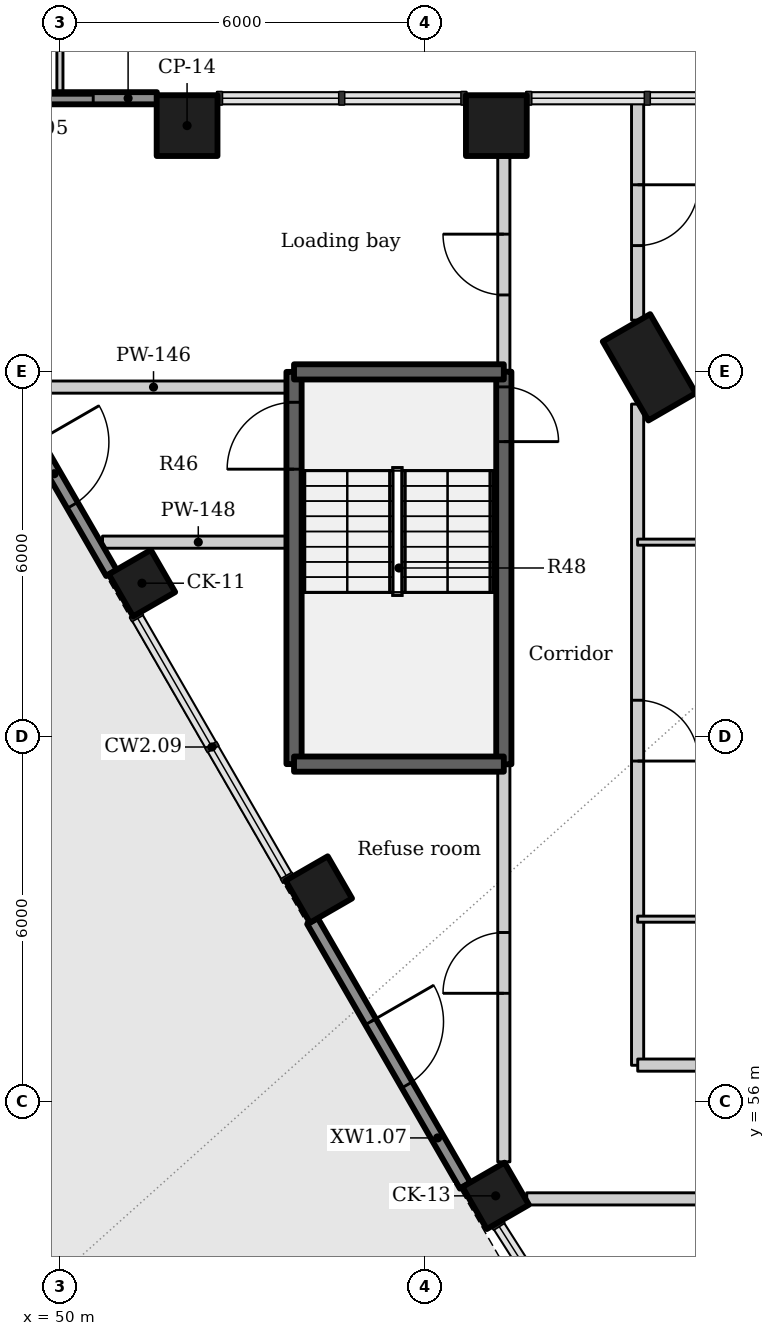
"""IFC4 building model, lengths in metres.
Left out: names, types, materials, properties, quantities, classifications, styles, units other than length and angle.
Written with IfcOpenShell. Run it as: python <this file> out.ifc"""

import sys

from ifc_helpers import new_model, si_unit, direction, frame, frame_2d, origin, origin_2d, place, context, subcontext, project, spatial, rectangle, extrude, element, fill, save


model = new_model("IFC4")
c1 = context("Model", 3, precision=1e-05, world=origin(), true_north=direction((0.0, 1.0)))
c2 = subcontext(c1, "Body", "Model", "MODEL_VIEW")
j1 = project(units=[si_unit("LENGTHUNIT", "METRE"), si_unit("PLANEANGLEUNIT", "RADIAN")], contexts=[c1])
p1 = place(None, origin())
s1 = spatial("IfcSite", under=j1, at=p1, CompositionType="ELEMENT")
p2 = place(p1, origin())
s2 = spatial("IfcBuilding", under=s1, at=p2, CompositionType="ELEMENT")
p3 = place(p2, origin())
s3 = spatial("IfcBuildingStorey", under=s2, at=p3, CompositionType="ELEMENT", Elevation=0.0)
p4 = place(p3, frame((59.692, 68.075, -1.8), z_axis=(0.0, 0.0, 1.0), x_axis=(0.5, -0.866025403784, 0.0)))
e1 = element("IfcColumn", 1, at=p4, inside=s3, PredefinedType="COLUMN", context=c2, shape_type="SweptSolid", body=[
    extrude(rectangle(XDim=1.5, YDim=0.9, at=origin_2d()), origin(), (0.0, 0.0, 1.0), 8.4),
])
for number, where, z_axis, x_axis in (
    (2, (51.349, 64.525, -1.8), (0.0, 0.0, 1.0), (0.5, -0.866, 0.0)),
    (3, (54.257, 59.487, -1.8), (0.0, 0.0, 1.0), (0.5, -0.866, 0.0)),
    (4, (57.166, 54.45, -1.8), (0.0, 0.0, 1.0), (0.5, -0.866, 0.0)),
):
    element("IfcColumn", number, at=place(p3, frame(where, z_axis=z_axis, x_axis=x_axis)), inside=s3, PredefinedType="COLUMN", context=c2, shape_type="SweptSolid", body=[
        extrude(rectangle(XDim=0.8, YDim=0.8, at=origin_2d()), origin(), (0.0, 0.0, 1.0), 8.4),
    ])
for number, where, z_axis, x_axis in (
    (5, (57.177, 72.05, -1.8), (0.0, 0.0, 1.0), (1.0, 0.0, 0.0)),
    (6, (52.091, 72.05, -1.8), (0.0, 0.0, 1.0), (1.0, 0.0, 0.0)),
):
    element("IfcColumn", number, at=place(p3, frame(where, z_axis=z_axis, x_axis=x_axis)), inside=s3, PredefinedType="COLUMN", context=c2, shape_type="SweptSolid", body=[
        extrude(rectangle(XDim=1.0, YDim=1.0, at=origin_2d()), origin(), (0.0, 0.0, 1.0), 8.4),
    ])
p5 = place(p3, frame((51.595, 72.5, 0.0), z_axis=(0.0, 0.0, 1.0), x_axis=(-1.0, 0.0, 0.0)))
e7 = element("IfcWall", 7, at=p5, inside=s3, PredefinedType="SOLIDWALL", context=c2, shape_type="SweptSolid", body=[
    extrude(rectangle(XDim=4.095, YDim=0.2, at=frame_2d((2.047, 0.0))), origin(), (0.0, 0.0, 1.0), 5.4),
])
p6 = place(p5, frame((1.048, 0.0, 0.0)))
e8 = element("IfcOpeningElement", 8, at=p6, cuts=e7, PredefinedType="OPENING", context=c2, shape_type="SweptSolid", body=[
    extrude(rectangle(XDim=2.0, YDim=3.0, at=frame_2d((1.0, 1.5))), frame((0.0, 0.11, 0.0), z_axis=(0.0, -1.0, 0.0), x_axis=(1.0, 0.0, 0.0)), (0.0, 0.0, 1.0), 0.22),
])
p7 = place(p3, frame((48.336, 69.044, 0.0), z_axis=(0.0, 0.0, 1.0), x_axis=(0.499953773667, -0.866052090925, 0.0)))
e9 = element("IfcWall", 9, at=p7, inside=s3, PredefinedType="SOLIDWALL", context=c2, shape_type="SweptSolid", body=[
    extrude(rectangle(XDim=5.025, YDim=0.2, at=frame_2d((2.512, 0.0))), origin(), (0.0, 0.0, 1.0), 5.4),
])
p8 = place(p7, frame((2.54, 0.0, 0.0)))
e10 = element("IfcOpeningElement", 10, at=p8, cuts=e9, PredefinedType="OPENING", context=c2, shape_type="SweptSolid", body=[
    extrude(rectangle(XDim=1.2, YDim=2.4, at=frame_2d((0.6, 1.2))), frame((0.0, 0.11, 0.0), z_axis=(0.0, -1.0, 0.0), x_axis=(1.0, 0.0, 0.0)), (0.0, 0.0, 1.0), 0.22),
])
p9 = place(p3, frame((54.152, 58.969, 0.0), z_axis=(0.0, 0.0, 1.0), x_axis=(0.500011252833, -0.866018906861, 0.0)))
e11 = element("IfcWall", 11, at=p9, inside=s3, PredefinedType="SOLIDWALL", context=c2, shape_type="SweptSolid", body=[
    extrude(rectangle(XDim=5.025, YDim=0.2, at=frame_2d((2.512, 0.0))), origin(), (0.0, 0.0, 1.0), 5.4),
])
p10 = place(p9, frame((1.912, 0.0, 0.0)))
e12 = element("IfcOpeningElement", 12, at=p10, cuts=e11, PredefinedType="OPENING", context=c2, shape_type="SweptSolid", body=[
    extrude(rectangle(XDim=1.2, YDim=2.4, at=frame_2d((0.6, 1.2))), frame((0.0, 0.11, 0.0), z_axis=(0.0, -1.0, 0.0), x_axis=(1.0, 0.0, 0.0)), (0.0, 0.0, 1.0), 0.22),
])
p11 = place(p3, frame((57.3, 68.003, -1.8), z_axis=(0.0, 0.0, 1.0), x_axis=(0.0, -1.0, 0.0)))
e13 = element("IfcWall", 13, at=p11, inside=s3, PredefinedType="SHEAR", context=c2, shape_type="SweptSolid", body=[
    extrude(rectangle(XDim=6.456, YDim=0.25, at=frame_2d((3.228, 0.0))), origin(), (0.0, 0.0, 1.0), 8.1),
])
p12 = place(p11, frame((0.25, 0.0, 1.8)))
e14 = element("IfcOpeningElement", 14, at=p12, cuts=e13, PredefinedType="OPENING", context=c2, shape_type="SweptSolid", body=[
    extrude(rectangle(XDim=0.9, YDim=2.1, at=frame_2d((0.45, 1.05))), frame((0.0, 0.135, 0.0), z_axis=(0.0, -1.0, 0.0), x_axis=(1.0, 0.0, 0.0)), (0.0, 0.0, 1.0), 0.27),
])
p13 = place(p3, frame((57.3, 55.009, 0.0), z_axis=(0.0, 0.0, 1.0), x_axis=(0.0, 1.0, 0.0)))
e15 = element("IfcWall", 15, at=p13, inside=s3, PredefinedType="PARTITIONING", context=c2, shape_type="SweptSolid", body=[
    extrude(rectangle(XDim=6.544, YDim=0.2, at=frame_2d((3.272, 0.0))), origin(), (0.0, 0.0, 1.0), 6.3),
])
p14 = place(p13, frame((2.772, 0.0, 0.0)))
e16 = element("IfcOpeningElement", 16, at=p14, cuts=e15, PredefinedType="OPENING", context=c2, shape_type="SweptSolid", body=[
    extrude(rectangle(XDim=1.0, YDim=2.1, at=frame_2d((0.5, 1.05))), frame((0.0, 0.11, 0.0), z_axis=(0.0, -1.0, 0.0), x_axis=(1.0, 0.0, 0.0)), (0.0, 0.0, 1.0), 0.22),
])
p15 = place(p3, frame((57.3, 67.997, 0.0), z_axis=(0.0, 0.0, 1.0), x_axis=(0.0, 1.0, 0.0)))
e17 = element("IfcWall", 17, at=p15, inside=s3, PredefinedType="PARTITIONING", context=c2, shape_type="SweptSolid", body=[
    extrude(rectangle(XDim=3.536, YDim=0.2, at=frame_2d((1.768, 0.0))), origin(), (0.0, 0.0, 1.0), 6.3),
])
p16 = place(p15, frame((1.268, 0.0, 0.0)))
e18 = element("IfcOpeningElement", 18, at=p16, cuts=e17, PredefinedType="OPENING", context=c2, shape_type="SweptSolid", body=[
    extrude(rectangle(XDim=1.0, YDim=2.1, at=frame_2d((0.5, 1.05))), frame((0.0, 0.11, 0.0), z_axis=(0.0, -1.0, 0.0), x_axis=(1.0, 0.0, 0.0)), (0.0, 0.0, 1.0), 0.22),
])
p17 = place(p3, frame((59.5, 67.47, 0.0), z_axis=(0.0, 0.0, 1.0), x_axis=(0.0, -1.0, 0.0)))
e19 = element("IfcWall", 19, at=p17, inside=s3, PredefinedType="PARTITIONING", context=c2, shape_type="SweptSolid", body=[
    extrude(rectangle(XDim=10.873, YDim=0.2, at=frame_2d((5.437, 0.0))), origin(), (0.0, 0.0, 1.0), 6.3),
])
p18 = place(p17, frame((4.87, 0.0, 0.0)))
e20 = element("IfcOpeningElement", 20, at=p18, cuts=e19, PredefinedType="OPENING", context=c2, shape_type="SweptSolid", body=[
    extrude(rectangle(XDim=1.0, YDim=2.1, at=frame_2d((0.5, 1.05))), frame((0.0, 0.11, 0.0), z_axis=(0.0, -1.0, 0.0), x_axis=(1.0, 0.0, 0.0)), (0.0, 0.0, 1.0), 0.22),
])
p19 = place(p3, frame((59.5, 72.42, 0.0), z_axis=(0.0, 0.0, 1.0), x_axis=(0.0, -1.0, 0.0)))
e21 = element("IfcWall", 21, at=p19, inside=s3, PredefinedType="PARTITIONING", context=c2, shape_type="SweptSolid", body=[
    extrude(rectangle(XDim=3.569, YDim=0.2, at=frame_2d((1.785, 0.0))), origin(), (0.0, 0.0, 1.0), 5.53),
])
p20 = place(p19, frame((1.343, 0.0, 0.0)))
e22 = element("IfcOpeningElement", 22, at=p20, cuts=e21, PredefinedType="OPENING", context=c2, shape_type="SweptSolid", body=[
    extrude(rectangle(XDim=1.0, YDim=2.1, at=frame_2d((0.5, 1.05))), frame((0.0, 0.11, 0.0), z_axis=(0.0, -1.0, 0.0), x_axis=(1.0, 0.0, 0.0)), (0.0, 0.0, 1.0), 0.22),
])
p21 = place(p3, frame((53.85, 61.55, -1.8), z_axis=(0.0, 0.0, 1.0), x_axis=(0.0, 1.0, 0.0)))
e23 = element("IfcWall", 23, at=p21, inside=s3, PredefinedType="SHEAR", context=c2, shape_type="SweptSolid", body=[
    extrude(rectangle(XDim=6.45, YDim=0.25, at=frame_2d((3.225, 0.0))), origin(), (0.0, 0.0, 1.0), 8.1),
])
p22 = place(p21, frame((4.85, 0.0, 1.8)))
e24 = element("IfcOpeningElement", 24, at=p22, cuts=e23, PredefinedType="OPENING", context=c2, shape_type="SweptSolid", body=[
    extrude(rectangle(XDim=1.1, YDim=2.1, at=frame_2d((0.55, 1.05))), frame((0.0, 0.135, 0.0), z_axis=(0.0, -1.0, 0.0), x_axis=(1.0, 0.0, 0.0)), (0.0, 0.0, 1.0), 0.27),
])
p23 = place(p3, frame((78.4, 54.4, 0.0), z_axis=(0.0, 0.0, 1.0), x_axis=(-1.0, 0.0, 0.0)))
e25 = element("IfcWall", 25, at=p23, inside=s3, PredefinedType="PARTITIONING", context=c2, shape_type="SweptSolid", body=[
    extrude(rectangle(XDim=20.723, YDim=0.2, at=frame_2d((10.362, 0.0))), origin(), (0.0, 0.0, 1.0), 6.3),
])
p24 = place(p23, frame((11.85, 0.0, 0.0)))
e26 = element("IfcOpeningElement", 26, at=p24, cuts=e25, PredefinedType="OPENING", context=c2, shape_type="SweptSolid", body=[
    extrude(rectangle(XDim=1.0, YDim=2.1, at=frame_2d((0.5, 1.05))), frame((0.0, 0.11, 0.0), z_axis=(0.0, -1.0, 0.0), x_axis=(1.0, 0.0, 0.0)), (0.0, 0.0, 1.0), 0.22),
])
p25 = place(p3, frame((59.502, 56.6, 0.0), z_axis=(0.0, 0.0, 1.0), x_axis=(1.0, 0.0, 0.0)))
e27 = element("IfcWall", 27, at=p25, inside=s3, PredefinedType="PARTITIONING", context=c2, shape_type="SweptSolid", body=[
    extrude(rectangle(XDim=8.906, YDim=0.2, at=frame_2d((4.453, 0.0))), origin(), (0.0, 0.0, 1.0), 6.3),
])
p26 = place(p25, frame((3.951, 0.0, 0.0)))
e28 = element("IfcOpeningElement", 28, at=p26, cuts=e27, PredefinedType="OPENING", context=c2, shape_type="SweptSolid", body=[
    extrude(rectangle(XDim=1.0, YDim=2.1, at=frame_2d((0.5, 1.05))), frame((0.0, 0.11, 0.0), z_axis=(0.0, -1.0, 0.0), x_axis=(1.0, 0.0, 0.0)), (0.0, 0.0, 1.0), 0.22),
])
p27 = place(p3, frame((49.229, 67.75, 0.0), z_axis=(0.0, 0.0, 1.0), x_axis=(1.0, 0.0, 0.0)))
e29 = element("IfcWall", 29, at=p27, inside=s3, PredefinedType="PARTITIONING", context=c2, shape_type="SweptSolid", body=[
    extrude(rectangle(XDim=4.622, YDim=0.2, at=frame_2d((2.311, 0.0))), origin(), (0.0, 0.0, 1.0), 5.53),
])
p28 = place(p3, frame((50.701, 65.2, 0.0), z_axis=(0.0, 0.0, 1.0), x_axis=(1.0, 0.0, 0.0)))
e30 = element("IfcWall", 30, at=p28, inside=s3, PredefinedType="PARTITIONING", context=c2, shape_type="SweptSolid", body=[
    extrude(rectangle(XDim=3.149, YDim=0.2, at=frame_2d((1.575, 0.0))), origin(), (0.0, 0.0, 1.0), 5.53),
])
for number, where, z_axis, x_axis in (
    (31, (53.85, 68.0, -1.8), (0.0, 0.0, 1.0), (1.0, 0.0, 0.0)),
    (32, (53.85, 61.55, -1.8), (0.0, 0.0, 1.0), (1.0, 0.0, 0.0)),
):
    element("IfcWall", number, at=place(p3, frame(where, z_axis=z_axis, x_axis=x_axis)), inside=s3, PredefinedType="SHEAR", context=c2, shape_type="SweptSolid", body=[
        extrude(rectangle(XDim=3.45, YDim=0.25, at=frame_2d((1.725, 0.0))), origin(), (0.0, 0.0, 1.0), 8.1),
    ])
p29 = place(p3, frame((59.5, 65.2, 0.0), z_axis=(0.0, 0.0, 1.0), x_axis=(1.0, 0.0, 0.0)))
e33 = element("IfcWall", 33, at=p29, inside=s3, PredefinedType="PARTITIONING", context=c2, shape_type="SweptSolid", body=[
    extrude(rectangle(XDim=2.82, YDim=0.1, at=frame_2d((1.41, 0.0))), origin(), (0.0, 0.0, 1.0), 5.38),
])
p30 = place(p3, frame((59.5, 59.0, 0.0), z_axis=(0.0, 0.0, 1.0), x_axis=(1.0, 0.0, 0.0)))
e34 = element("IfcWall", 34, at=p30, inside=s3, PredefinedType="PARTITIONING", context=c2, shape_type="SweptSolid", body=[
    extrude(rectangle(XDim=4.81, YDim=0.1, at=frame_2d((2.405, 0.0))), origin(), (0.0, 0.0, 1.0), 6.3),
])
p31 = place(p3, frame((50.0, 72.6, 0.0), z_axis=(0.0, 0.0, 1.0), x_axis=(0.0, 1.0, 0.0)))
e35 = element("IfcWall", 35, at=p31, inside=s3, PredefinedType="PARTITIONING", context=c2, shape_type="SweptSolid", body=[
    extrude(rectangle(XDim=14.8, YDim=0.1, at=frame_2d((7.4, 0.0))), origin(), (0.0, 0.0, 1.0), 6.3),
])
p32 = place(p31, frame((6.65, 0.0, 0.0)))
e36 = element("IfcOpeningElement", 36, at=p32, cuts=e35, PredefinedType="OPENING", context=c2, shape_type="SweptSolid", body=[
    extrude(rectangle(XDim=1.5, YDim=2.1, at=frame_2d((0.75, 1.05))), frame((0.0, 0.06, 0.0), z_axis=(0.0, -1.0, 0.0), x_axis=(1.0, 0.0, 0.0)), (0.0, 0.0, 1.0), 0.12),
])
p33 = place(p6, origin())
e37 = element("IfcDoor", 37, at=p33, inside=s3, OperationType="ROLLINGUP", PredefinedType="GATE", context=c2, shape_type="SweptSolid", body=[
    extrude(rectangle(XDim=2.0, YDim=3.0, at=frame_2d((1.0, 1.5))), frame((0.0, 0.025, 0.0), z_axis=(0.0, -1.0, 0.0), x_axis=(1.0, 0.0, 0.0)), (0.0, 0.0, 1.0), 0.05),
])
fill(e8, e37)
p34 = place(p8, frame((1.2, 0.0, 0.0), z_axis=(0.0, 0.0, 1.0), x_axis=(-1.0, 0.0, 0.0)))
e38 = element("IfcDoor", 38, at=p34, inside=s3, OperationType="SINGLE_SWING_LEFT", PredefinedType="DOOR", context=c2, shape_type="SweptSolid", body=[
    extrude(rectangle(XDim=1.2, YDim=2.4, at=frame_2d((0.6, 1.2))), frame((0.0, 0.025, 0.0), z_axis=(0.0, -1.0, 0.0), x_axis=(1.0, 0.0, 0.0)), (0.0, 0.0, 1.0), 0.05),
])
fill(e10, e38)
p35 = place(p10, frame((1.2, 0.0, 0.0), z_axis=(0.0, 0.0, 1.0), x_axis=(-1.0, 0.0, 0.0)))
e39 = element("IfcDoor", 39, at=p35, inside=s3, OperationType="SINGLE_SWING_LEFT", PredefinedType="DOOR", context=c2, shape_type="SweptSolid", body=[
    extrude(rectangle(XDim=1.2, YDim=2.4, at=frame_2d((0.6, 1.2))), frame((0.0, 0.025, 0.0), z_axis=(0.0, -1.0, 0.0), x_axis=(1.0, 0.0, 0.0)), (0.0, 0.0, 1.0), 0.05),
])
fill(e12, e39)
p36 = place(p22, origin())
e40 = element("IfcDoor", 40, at=p36, inside=s3, OperationType="SINGLE_SWING_LEFT", PredefinedType="DOOR", context=c2, shape_type="SweptSolid", body=[
    extrude(rectangle(XDim=1.1, YDim=2.1, at=frame_2d((0.55, 1.05))), frame((0.0, 0.025, 0.0), z_axis=(0.0, -1.0, 0.0), x_axis=(1.0, 0.0, 0.0)), (0.0, 0.0, 1.0), 0.05),
])
fill(e24, e40)
p37 = place(p12, origin())
e41 = element("IfcDoor", 41, at=p37, inside=s3, OperationType="SINGLE_SWING_RIGHT", PredefinedType="DOOR", context=c2, shape_type="SweptSolid", body=[
    extrude(rectangle(XDim=0.9, YDim=2.1, at=frame_2d((0.45, 1.05))), frame((0.0, 0.025, 0.0), z_axis=(0.0, -1.0, 0.0), x_axis=(1.0, 0.0, 0.0)), (0.0, 0.0, 1.0), 0.05),
])
fill(e14, e41)
p38 = place(p16, origin())
e42 = element("IfcDoor", 42, at=p38, inside=s3, OperationType="SINGLE_SWING_RIGHT", PredefinedType="DOOR", context=c2, shape_type="SweptSolid", body=[
    extrude(rectangle(XDim=1.0, YDim=2.1, at=frame_2d((0.5, 1.05))), frame((0.0, 0.025, 0.0), z_axis=(0.0, -1.0, 0.0), x_axis=(1.0, 0.0, 0.0)), (0.0, 0.0, 1.0), 0.05),
])
fill(e18, e42)
p39 = place(p14, origin())
e43 = element("IfcDoor", 43, at=p39, inside=s3, OperationType="SINGLE_SWING_LEFT", PredefinedType="DOOR", context=c2, shape_type="SweptSolid", body=[
    extrude(rectangle(XDim=1.0, YDim=2.1, at=frame_2d((0.5, 1.05))), frame((0.0, 0.025, 0.0), z_axis=(0.0, -1.0, 0.0), x_axis=(1.0, 0.0, 0.0)), (0.0, 0.0, 1.0), 0.05),
])
fill(e16, e43)
p40 = place(p20, origin())
e44 = element("IfcDoor", 44, at=p40, inside=s3, OperationType="SINGLE_SWING_LEFT", PredefinedType="DOOR", context=c2, shape_type="SweptSolid", body=[
    extrude(rectangle(XDim=1.0, YDim=2.1, at=frame_2d((0.5, 1.05))), frame((0.0, 0.025, 0.0), z_axis=(0.0, -1.0, 0.0), x_axis=(1.0, 0.0, 0.0)), (0.0, 0.0, 1.0), 0.05),
])
fill(e22, e44)
p41 = place(p18, origin())
e45 = element("IfcDoor", 45, at=p41, inside=s3, OperationType="SINGLE_SWING_RIGHT", PredefinedType="DOOR", context=c2, shape_type="SweptSolid", body=[
    extrude(rectangle(XDim=1.0, YDim=2.1, at=frame_2d((0.5, 1.05))), frame((0.0, 0.025, 0.0), z_axis=(0.0, -1.0, 0.0), x_axis=(1.0, 0.0, 0.0)), (0.0, 0.0, 1.0), 0.05),
])
fill(e20, e45)
save(model, sys.argv[1])
